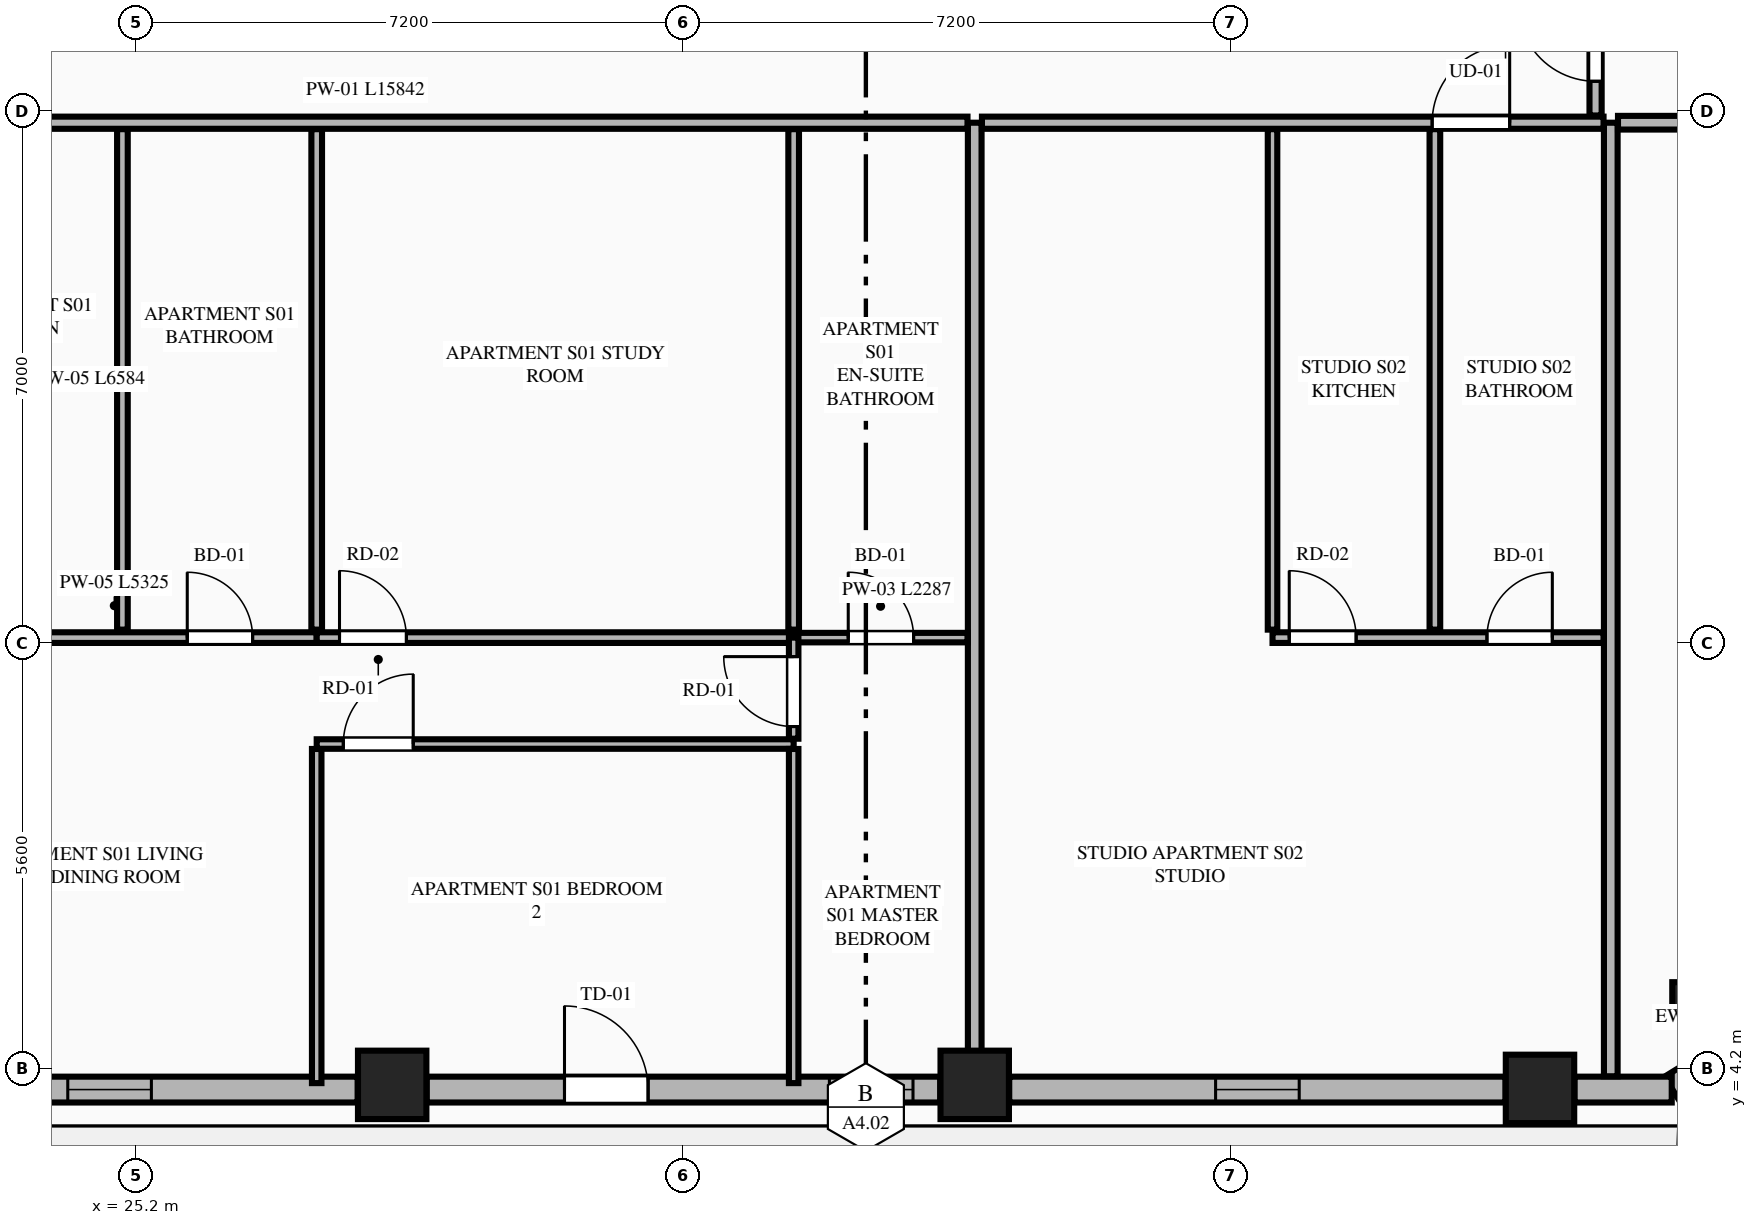
"""IFC4 building model, lengths in metres.
Left out: names, types, materials, properties, quantities, classifications, styles, units other than length and angle.
Written with IfcOpenShell. Run it as: python <this file> out.ifc"""

import sys

from ifc_helpers import new_model, si_unit, direction, frame, frame_2d, origin, origin_2d, place, context, subcontext, project, spatial, rectangle, extrude, element, fill, save


model = new_model("IFC4")
c1 = context("Model", 3, precision=1e-05, world=origin(), true_north=direction((0.0, 1.0)))
c2 = subcontext(c1, "Body", "Model", "MODEL_VIEW")
j1 = project(units=[si_unit("LENGTHUNIT", "METRE"), si_unit("PLANEANGLEUNIT", "RADIAN")], contexts=[c1])
p1 = place(None, origin())
s1 = spatial("IfcSite", under=j1, at=p1, CompositionType="ELEMENT")
p2 = place(p1, origin())
s2 = spatial("IfcBuilding", under=s1, at=p2, CompositionType="ELEMENT")
p3 = place(p2, frame((0.0, 0.0, 157.05)))
s3 = spatial("IfcBuildingStorey", under=s2, at=p3, CompositionType="ELEMENT", Elevation=157.05)
for number, where, z_axis, x_axis in (
    (1, (28.568, 3.992, 0.0), (0.0, 0.0, 1.0), (1.0, 0.0, 0.0)),
    (2, (36.232, 3.992, 0.0), (0.0, 0.0, 1.0), (1.0, 0.0, 0.0)),
    (3, (43.669, 3.939, 0.0), (0.0, 0.0, 1.0), (1.0, 0.0, 0.0)),
):
    element("IfcColumn", number, at=place(p3, frame(where, z_axis=z_axis, x_axis=x_axis)), inside=s3, PredefinedType="COLUMN", context=c2, shape_type="SweptSolid", body=[
        extrude(rectangle(XDim=0.9, YDim=0.9, at=origin_2d()), origin(), (0.0, 0.0, 1.0), 3.55),
    ])
p4 = place(p3, frame((45.659, 5.093, 0.0), z_axis=(0.0, 0.0, 1.0), x_axis=(0.865160173452, 0.501495637342, 0.0)))
e4 = element("IfcColumn", 4, at=p4, inside=s3, PredefinedType="PILASTER", context=c2, shape_type="SweptSolid", body=[
    extrude(rectangle(XDim=0.5, YDim=0.35, at=origin_2d()), origin(), (0.0, 0.0, 1.0), 3.55),
])
p5 = place(p3, frame((45.397, 3.955, 0.0), z_axis=(0.0, 0.0, 1.0), x_axis=(0.851798915137, 0.523868884523, 0.0)))
e5 = element("IfcWall", 5, at=p5, inside=s3, PredefinedType="STANDARD", context=c2, shape_type="SweptSolid", body=[
    extrude(rectangle(XDim=1.848, YDim=0.34, at=frame_2d((0.924, 0.0))), origin(), (0.0, 0.0, 1.0), 3.34),
])
p6 = place(p3, frame((21.585, 3.93, 0.0), z_axis=(0.0, 0.0, 1.0), x_axis=(1.0, 0.0, 0.0)))
e6 = element("IfcWall", 6, at=p6, inside=s3, PredefinedType="STANDARD", context=c2, shape_type="SweptSolid", body=[
    extrude(rectangle(XDim=6.529, YDim=0.34, at=frame_2d((3.265, 0.0))), origin(), (0.0, 0.0, 1.0), 2.797),
])
p7 = place(p6, frame((2.715, 0.0, 0.75)))
e7 = element("IfcOpeningElement", 7, at=p7, cuts=e6, PredefinedType="OPENING", context=c2, shape_type="SweptSolid", body=[
    extrude(rectangle(XDim=1.1, YDim=1.897, at=frame_2d((0.55, 0.948))), frame((0.0, 0.18, 0.0), z_axis=(0.0, -1.0, 0.0), x_axis=(1.0, 0.0, 0.0)), (0.0, 0.0, 1.0), 0.36),
])
p8 = place(p3, frame((29.022, 3.93, 0.0), z_axis=(0.0, 0.0, 1.0), x_axis=(1.0, 0.0, 0.0)))
e8 = element("IfcWall", 8, at=p8, inside=s3, PredefinedType="STANDARD", context=c2, shape_type="SweptSolid", body=[
    extrude(rectangle(XDim=6.756, YDim=0.34, at=frame_2d((3.378, 0.0))), origin(), (0.0, 0.0, 1.0), 2.797),
])
p9 = place(p8, frame((1.813, 0.0, 0.0)))
e9 = element("IfcOpeningElement", 9, at=p9, cuts=e8, PredefinedType="OPENING", context=c2, shape_type="SweptSolid", body=[
    extrude(rectangle(XDim=1.1, YDim=2.25, at=frame_2d((0.55, 1.125))), frame((0.0, 0.18, 0.0), z_axis=(0.0, -1.0, 0.0), x_axis=(1.0, 0.0, 0.0)), (0.0, 0.0, 1.0), 0.36),
])
p10 = place(p8, frame((5.298, 0.0, 0.75)))
e10 = element("IfcOpeningElement", 10, at=p10, cuts=e8, PredefinedType="OPENING", context=c2, shape_type="SweptSolid", body=[
    extrude(rectangle(XDim=1.1, YDim=1.897, at=frame_2d((0.55, 0.948))), frame((0.0, 0.18, 0.0), z_axis=(0.0, -1.0, 0.0), x_axis=(1.0, 0.0, 0.0)), (0.0, 0.0, 1.0), 0.36),
])
p11 = place(p3, frame((36.686, 3.93, 0.0), z_axis=(0.0, 0.0, 1.0), x_axis=(1.0, 0.0, 0.0)))
e11 = element("IfcWall", 11, at=p11, inside=s3, PredefinedType="STANDARD", context=c2, shape_type="SweptSolid", body=[
    extrude(rectangle(XDim=6.529, YDim=0.34, at=frame_2d((3.265, 0.0))), origin(), (0.0, 0.0, 1.0), 2.797),
])
p12 = place(p11, frame((2.715, 0.0, 0.75)))
e12 = element("IfcOpeningElement", 12, at=p12, cuts=e11, PredefinedType="OPENING", context=c2, shape_type="SweptSolid", body=[
    extrude(rectangle(XDim=1.1, YDim=1.897, at=frame_2d((0.55, 0.948))), frame((0.0, 0.18, 0.0), z_axis=(0.0, -1.0, 0.0), x_axis=(1.0, 0.0, 0.0)), (0.0, 0.0, 1.0), 0.36),
])
p13 = place(p3, frame((44.123, 3.93, 0.0), z_axis=(0.0, 0.0, 1.0), x_axis=(1.0, 0.0, 0.0)))
e13 = element("IfcWall", 13, at=p13, inside=s3, PredefinedType="STANDARD", context=c2, shape_type="SweptSolid", body=[
    extrude(rectangle(XDim=1.279, YDim=0.34, at=frame_2d((0.64, 0.0))), origin(), (0.0, 0.0, 1.0), 3.34),
])
p14 = place(p3, frame((36.232, 4.105, 0.0), z_axis=(0.0, 0.0, 1.0), x_axis=(0.0, 1.0, 0.0)))
e14 = element("IfcWall", 14, at=p14, inside=s3, PredefinedType="PARTITIONING", context=c2, shape_type="SweptSolid", body=[
    extrude(rectangle(XDim=12.545, YDim=0.18, at=frame_2d((6.272, 0.0))), origin(), (0.0, 0.0, 1.0), 2.722),
])
p15 = place(p3, frame((44.6, 4.105, 0.0), z_axis=(0.0, 0.0, 1.0), x_axis=(0.0, 1.0, 0.0)))
e15 = element("IfcWall", 15, at=p15, inside=s3, PredefinedType="PARTITIONING", context=c2, shape_type="SweptSolid", body=[
    extrude(rectangle(XDim=12.545, YDim=0.18, at=frame_2d((6.272, 0.0))), origin(), (0.0, 0.0, 1.0), 3.34),
])
p16 = place(p3, frame((20.295, 16.65, 0.0), z_axis=(0.0, 0.0, 1.0), x_axis=(1.0, 0.0, 0.0)))
e16 = element("IfcWall", 16, at=p16, inside=s3, PredefinedType="PARTITIONING", context=c2, shape_type="SweptSolid", body=[
    extrude(rectangle(XDim=15.842, YDim=0.16, at=frame_2d((7.921, 0.0))), origin(), (0.0, 0.0, 1.0), 3.34),
])
p17 = place(p16, frame((0.405, 0.0, 0.0)))
e17 = element("IfcOpeningElement", 17, at=p17, cuts=e16, PredefinedType="OPENING", context=c2, shape_type="SweptSolid", body=[
    extrude(rectangle(XDim=1.35, YDim=2.35, at=frame_2d((0.675, 1.175))), frame((0.0, 0.09, 0.0), z_axis=(0.0, -1.0, 0.0), x_axis=(1.0, 0.0, 0.0)), (0.0, 0.0, 1.0), 0.18),
])
p18 = place(p3, frame((22.25, 9.876, 0.0), z_axis=(0.0, 0.0, 1.0), x_axis=(1.0, 0.0, 0.0)))
e18 = element("IfcWall", 18, at=p18, inside=s3, PredefinedType="PLUMBINGWALL", context=c2, shape_type="SweptSolid", body=[
    extrude(rectangle(XDim=5.325, YDim=0.14, at=frame_2d((2.663, 0.0))), origin(), (0.0, 0.0, 1.0), 3.34),
])
p19 = place(p18, frame((3.622, 0.0, 0.0)))
e19 = element("IfcOpeningElement", 19, at=p19, cuts=e18, PredefinedType="OPENING", context=c2, shape_type="SweptSolid", body=[
    extrude(rectangle(XDim=0.86, YDim=2.1, at=frame_2d((0.43, 1.05))), frame((0.0, 0.08, 0.0), z_axis=(0.0, -1.0, 0.0), x_axis=(1.0, 0.0, 0.0)), (0.0, 0.0, 1.0), 0.16),
])
p20 = place(p18, frame((0.26, 0.0, 0.0)))
e20 = element("IfcOpeningElement", 20, at=p20, cuts=e18, PredefinedType="OPENING", context=c2, shape_type="SweptSolid", body=[
    extrude(rectangle(XDim=0.88, YDim=2.15, at=frame_2d((0.44, 1.075))), frame((0.0, 0.08, 0.0), z_axis=(0.0, -1.0, 0.0), x_axis=(1.0, 0.0, 0.0)), (0.0, 0.0, 1.0), 0.16),
])
p21 = place(p3, frame((27.575, 9.876, 0.0), z_axis=(0.0, 0.0, 1.0), x_axis=(1.0, 0.0, 0.0)))
e21 = element("IfcWall", 21, at=p21, inside=s3, PredefinedType="PLUMBINGWALL", context=c2, shape_type="SweptSolid", body=[
    extrude(rectangle(XDim=6.275, YDim=0.14, at=frame_2d((3.138, 0.0))), origin(), (0.0, 0.0, 1.0), 3.34),
])
p22 = place(p21, frame((0.3, 0.0, 0.0)))
e22 = element("IfcOpeningElement", 22, at=p22, cuts=e21, PredefinedType="OPENING", context=c2, shape_type="SweptSolid", body=[
    extrude(rectangle(XDim=0.88, YDim=2.15, at=frame_2d((0.44, 1.075))), frame((0.0, 0.08, 0.0), z_axis=(0.0, -1.0, 0.0), x_axis=(1.0, 0.0, 0.0)), (0.0, 0.0, 1.0), 0.16),
])
p23 = place(p3, frame((33.85, 9.876, 0.0), z_axis=(0.0, 0.0, 1.0), x_axis=(1.0, 0.0, 0.0)))
e23 = element("IfcWall", 23, at=p23, inside=s3, PredefinedType="PARTITIONING", context=c2, shape_type="SweptSolid", body=[
    extrude(rectangle(XDim=2.287, YDim=0.125, at=frame_2d((1.144, 0.0))), origin(), (0.0, 0.0, 1.0), 3.34),
])
p24 = place(p23, frame((0.718, 0.0, 0.0)))
e24 = element("IfcOpeningElement", 24, at=p24, cuts=e23, PredefinedType="OPENING", context=c2, shape_type="SweptSolid", body=[
    extrude(rectangle(XDim=0.86, YDim=2.1, at=frame_2d((0.43, 1.05))), frame((0.0, 0.073, 0.0), z_axis=(0.0, -1.0, 0.0), x_axis=(1.0, 0.0, 0.0)), (0.0, 0.0, 1.0), 0.145),
])
p25 = place(p3, frame((25.019, 9.981, 0.0), z_axis=(0.0, 0.0, 1.0), x_axis=(0.0, 1.0, 0.0)))
e25 = element("IfcWall", 25, at=p25, inside=s3, PredefinedType="PLUMBINGWALL", context=c2, shape_type="SweptSolid", body=[
    extrude(rectangle(XDim=6.584, YDim=0.14, at=frame_2d((3.292, 0.0))), origin(), (0.0, 0.0, 1.0), 3.34),
])
p26 = place(p3, frame((27.575, 4.015, 0.0), z_axis=(0.0, 0.0, 1.0), x_axis=(0.0, 1.0, 0.0)))
e26 = element("IfcWall", 26, at=p26, inside=s3, PredefinedType="PARTITIONING", context=c2, shape_type="SweptSolid", body=[
    extrude(rectangle(XDim=4.396, YDim=0.125, at=frame_2d((2.198, 0.0))), origin(), (0.0, 0.0, 1.0), 3.34),
])
p27 = place(p3, frame((27.575, 8.476, 0.0), z_axis=(0.0, 0.0, 1.0), x_axis=(1.0, 0.0, 0.0)))
e27 = element("IfcWall", 27, at=p27, inside=s3, PredefinedType="PARTITIONING", context=c2, shape_type="SweptSolid", body=[
    extrude(rectangle(XDim=6.275, YDim=0.125, at=frame_2d((3.138, 0.0))), origin(), (0.0, 0.0, 1.0), 3.34),
])
p28 = place(p27, frame((0.35, 0.0, 0.0)))
e28 = element("IfcOpeningElement", 28, at=p28, cuts=e27, PredefinedType="OPENING", context=c2, shape_type="SweptSolid", body=[
    extrude(rectangle(XDim=0.92, YDim=2.15, at=frame_2d((0.46, 1.075))), frame((0.0, 0.073, 0.0), z_axis=(0.0, -1.0, 0.0), x_axis=(1.0, 0.0, 0.0)), (0.0, 0.0, 1.0), 0.145),
])
p29 = place(p3, frame((33.85, 8.546, 0.0), z_axis=(0.0, 0.0, 1.0), x_axis=(0.0, 1.0, 0.0)))
e29 = element("IfcWall", 29, at=p29, inside=s3, PredefinedType="PARTITIONING", context=c2, shape_type="SweptSolid", body=[
    extrude(rectangle(XDim=1.33, YDim=0.125, at=frame_2d((0.665, 0.0))), origin(), (0.0, 0.0, 1.0), 3.34),
])
p30 = place(p29, frame((0.16, 0.0, 0.0)))
e30 = element("IfcOpeningElement", 30, at=p30, cuts=e29, PredefinedType="OPENING", context=c2, shape_type="SweptSolid", body=[
    extrude(rectangle(XDim=0.92, YDim=2.15, at=frame_2d((0.46, 1.075))), frame((0.0, 0.073, 0.0), z_axis=(0.0, -1.0, 0.0), x_axis=(1.0, 0.0, 0.0)), (0.0, 0.0, 1.0), 0.145),
])
for number, where, z_axis, x_axis in (
    (31, (27.575, 9.981, 0.0), (0.0, 0.0, 1.0), (0.0, 1.0, 0.0)),
    (32, (33.85, 9.981, 0.0), (0.0, 0.0, 1.0), (0.0, 1.0, 0.0)),
):
    element("IfcWall", number, at=place(p3, frame(where, z_axis=z_axis, x_axis=x_axis)), inside=s3, PredefinedType="PLUMBINGWALL", context=c2, shape_type="SweptSolid", body=[
        extrude(rectangle(XDim=6.584, YDim=0.14, at=frame_2d((3.292, 0.0))), origin(), (0.0, 0.0, 1.0), 3.34),
    ])
p31 = place(p3, frame((33.85, 4.015, 0.0), z_axis=(0.0, 0.0, 1.0), x_axis=(0.0, 1.0, 0.0)))
e33 = element("IfcWall", 33, at=p31, inside=s3, PredefinedType="PARTITIONING", context=c2, shape_type="SweptSolid", body=[
    extrude(rectangle(XDim=4.396, YDim=0.125, at=frame_2d((2.198, 0.0))), origin(), (0.0, 0.0, 1.0), 3.34),
])
p32 = place(p3, frame((36.327, 16.65, 0.0), z_axis=(0.0, 0.0, 1.0), x_axis=(1.0, 0.0, 0.0)))
e34 = element("IfcWall", 34, at=p32, inside=s3, PredefinedType="PARTITIONING", context=c2, shape_type="SweptSolid", body=[
    extrude(rectangle(XDim=8.178, YDim=0.16, at=frame_2d((4.089, 0.0))), origin(), (0.0, 0.0, 1.0), 3.34),
])
p33 = place(p32, frame((5.923, 0.0, 0.0)))
e35 = element("IfcOpeningElement", 35, at=p33, cuts=e34, PredefinedType="OPENING", context=c2, shape_type="SweptSolid", body=[
    extrude(rectangle(XDim=1.02, YDim=2.25, at=frame_2d((0.51, 1.125))), frame((0.0, 0.09, 0.0), z_axis=(0.0, -1.0, 0.0), x_axis=(1.0, 0.0, 0.0)), (0.0, 0.0, 1.0), 0.18),
])
p34 = place(p3, frame((40.15, 9.981, 0.0), z_axis=(0.0, 0.0, 1.0), x_axis=(0.0, 1.0, 0.0)))
e36 = element("IfcWall", 36, at=p34, inside=s3, PredefinedType="PARTITIONING", context=c2, shape_type="SweptSolid", body=[
    extrude(rectangle(XDim=6.584, YDim=0.125, at=frame_2d((3.292, 0.0))), origin(), (0.0, 0.0, 1.0), 3.34),
])
p35 = place(p3, frame((40.15, 9.876, 0.0), z_axis=(0.0, 0.0, 1.0), x_axis=(1.0, 0.0, 0.0)))
e37 = element("IfcWall", 37, at=p35, inside=s3, PredefinedType="PLUMBINGWALL", context=c2, shape_type="SweptSolid", body=[
    extrude(rectangle(XDim=4.355, YDim=0.14, at=frame_2d((2.177, 0.0))), origin(), (0.0, 0.0, 1.0), 3.34),
])
p36 = place(p35, frame((2.821, 0.0, 0.0)))
e38 = element("IfcOpeningElement", 38, at=p36, cuts=e37, PredefinedType="OPENING", context=c2, shape_type="SweptSolid", body=[
    extrude(rectangle(XDim=0.86, YDim=2.1, at=frame_2d((0.43, 1.05))), frame((0.0, 0.08, 0.0), z_axis=(0.0, -1.0, 0.0), x_axis=(1.0, 0.0, 0.0)), (0.0, 0.0, 1.0), 0.16),
])
p37 = place(p35, frame((0.22, 0.0, 0.0)))
e39 = element("IfcOpeningElement", 39, at=p37, cuts=e37, PredefinedType="OPENING", context=c2, shape_type="SweptSolid", body=[
    extrude(rectangle(XDim=0.88, YDim=2.15, at=frame_2d((0.44, 1.075))), frame((0.0, 0.08, 0.0), z_axis=(0.0, -1.0, 0.0), x_axis=(1.0, 0.0, 0.0)), (0.0, 0.0, 1.0), 0.16),
])
p38 = place(p3, frame((42.286, 9.981, 0.0), z_axis=(0.0, 0.0, 1.0), x_axis=(0.0, 1.0, 0.0)))
e40 = element("IfcWall", 40, at=p38, inside=s3, PredefinedType="PLUMBINGWALL", context=c2, shape_type="SweptSolid", body=[
    extrude(rectangle(XDim=6.584, YDim=0.14, at=frame_2d((3.292, 0.0))), origin(), (0.0, 0.0, 1.0), 2.722),
])
p39 = place(p3, frame((44.695, 16.65, 0.0), z_axis=(0.0, 0.0, 1.0), x_axis=(1.0, 0.0, 0.0)))
e41 = element("IfcWall", 41, at=p39, inside=s3, PredefinedType="PARTITIONING", context=c2, shape_type="SweptSolid", body=[
    extrude(rectangle(XDim=7.996, YDim=0.18, at=frame_2d((3.998, 0.0))), origin(), (0.0, 0.0, 1.0), 3.34),
])
p40 = place(p3, frame((44.4, 16.745, 0.0), z_axis=(0.0, 0.0, 1.0), x_axis=(0.0, 1.0, 0.0)))
e42 = element("IfcWall", 42, at=p40, inside=s3, PredefinedType="PARTITIONING", context=c2, shape_type="SweptSolid", body=[
    extrude(rectangle(XDim=18.31, YDim=0.16, at=frame_2d((9.155, 0.0))), origin(), (0.0, 0.0, 1.0), 3.34),
])
p41 = place(p40, frame((0.45, 0.0, 0.0)))
e43 = element("IfcOpeningElement", 43, at=p41, cuts=e42, PredefinedType="OPENING", context=c2, shape_type="SweptSolid", body=[
    extrude(rectangle(XDim=1.02, YDim=2.25, at=frame_2d((0.51, 1.125))), frame((0.0, 0.09, 0.0), z_axis=(0.0, -1.0, 0.0), x_axis=(1.0, 0.0, 0.0)), (0.0, 0.0, 1.0), 0.18),
])
p42 = place(p7, origin())
e44 = element("IfcWindow", 44, at=p42, inside=s3, PartitioningType="SINGLE_PANEL", PredefinedType="WINDOW", context=c2, shape_type="SweptSolid", body=[
    extrude(rectangle(XDim=1.1, YDim=1.897, at=frame_2d((0.55, 0.948))), frame((0.0, 0.03, 0.0), z_axis=(0.0, -1.0, 0.0), x_axis=(1.0, 0.0, 0.0)), (0.0, 0.0, 1.0), 0.06),
])
fill(e7, e44)
p43 = place(p9, origin())
e45 = element("IfcDoor", 45, at=p43, inside=s3, OperationType="SINGLE_SWING_LEFT", PredefinedType="DOOR", context=c2, shape_type="SweptSolid", body=[
    extrude(rectangle(XDim=1.1, YDim=2.25, at=frame_2d((0.55, 1.125))), frame((0.0, 0.025, 0.0), z_axis=(0.0, -1.0, 0.0), x_axis=(1.0, 0.0, 0.0)), (0.0, 0.0, 1.0), 0.05),
])
fill(e9, e45)
p44 = place(p12, origin())
e46 = element("IfcWindow", 46, at=p44, inside=s3, PartitioningType="SINGLE_PANEL", PredefinedType="WINDOW", context=c2, shape_type="SweptSolid", body=[
    extrude(rectangle(XDim=1.1, YDim=1.897, at=frame_2d((0.55, 0.948))), frame((0.0, 0.03, 0.0), z_axis=(0.0, -1.0, 0.0), x_axis=(1.0, 0.0, 0.0)), (0.0, 0.0, 1.0), 0.06),
])
fill(e12, e46)
p45 = place(p19, origin())
e47 = element("IfcDoor", 47, at=p45, inside=s3, OperationType="SINGLE_SWING_LEFT", PredefinedType="DOOR", context=c2, shape_type="SweptSolid", body=[
    extrude(rectangle(XDim=0.86, YDim=2.1, at=frame_2d((0.43, 1.05))), frame((0.0, 0.025, 0.0), z_axis=(0.0, -1.0, 0.0), x_axis=(1.0, 0.0, 0.0)), (0.0, 0.0, 1.0), 0.05),
])
fill(e19, e47)
p46 = place(p24, origin())
e48 = element("IfcDoor", 48, at=p46, inside=s3, OperationType="SINGLE_SWING_LEFT", PredefinedType="DOOR", context=c2, shape_type="SweptSolid", body=[
    extrude(rectangle(XDim=0.86, YDim=2.1, at=frame_2d((0.43, 1.05))), frame((0.0, 0.025, 0.0), z_axis=(0.0, -1.0, 0.0), x_axis=(1.0, 0.0, 0.0)), (0.0, 0.0, 1.0), 0.05),
])
fill(e24, e48)
p47 = place(p22, origin())
e49 = element("IfcDoor", 49, at=p47, inside=s3, OperationType="SINGLE_SWING_LEFT", PredefinedType="DOOR", context=c2, shape_type="SweptSolid", body=[
    extrude(rectangle(XDim=0.88, YDim=2.15, at=frame_2d((0.44, 1.075))), frame((0.0, 0.025, 0.0), z_axis=(0.0, -1.0, 0.0), x_axis=(1.0, 0.0, 0.0)), (0.0, 0.0, 1.0), 0.05),
])
fill(e22, e49)
p48 = place(p28, origin())
e50 = element("IfcDoor", 50, at=p48, inside=s3, OperationType="SINGLE_SWING_RIGHT", PredefinedType="DOOR", context=c2, shape_type="SweptSolid", body=[
    extrude(rectangle(XDim=0.92, YDim=2.15, at=frame_2d((0.46, 1.075))), frame((0.0, 0.025, 0.0), z_axis=(0.0, -1.0, 0.0), x_axis=(1.0, 0.0, 0.0)), (0.0, 0.0, 1.0), 0.05),
])
fill(e28, e50)
p49 = place(p30, origin())
e51 = element("IfcDoor", 51, at=p49, inside=s3, OperationType="SINGLE_SWING_RIGHT", PredefinedType="DOOR", context=c2, shape_type="SweptSolid", body=[
    extrude(rectangle(XDim=0.92, YDim=2.15, at=frame_2d((0.46, 1.075))), frame((0.0, 0.025, 0.0), z_axis=(0.0, -1.0, 0.0), x_axis=(1.0, 0.0, 0.0)), (0.0, 0.0, 1.0), 0.05),
])
fill(e30, e51)
p50 = place(p36, origin())
e52 = element("IfcDoor", 52, at=p50, inside=s3, OperationType="SINGLE_SWING_RIGHT", PredefinedType="DOOR", context=c2, shape_type="SweptSolid", body=[
    extrude(rectangle(XDim=0.86, YDim=2.1, at=frame_2d((0.43, 1.05))), frame((0.0, 0.025, 0.0), z_axis=(0.0, -1.0, 0.0), x_axis=(1.0, 0.0, 0.0)), (0.0, 0.0, 1.0), 0.05),
])
fill(e38, e52)
p51 = place(p33, origin())
e53 = element("IfcDoor", 53, at=p51, inside=s3, OperationType="SINGLE_SWING_RIGHT", PredefinedType="DOOR", context=c2, shape_type="SweptSolid", body=[
    extrude(rectangle(XDim=1.02, YDim=2.25, at=frame_2d((0.51, 1.125))), frame((0.0, 0.025, 0.0), z_axis=(0.0, -1.0, 0.0), x_axis=(1.0, 0.0, 0.0)), (0.0, 0.0, 1.0), 0.05),
])
fill(e35, e53)
p52 = place(p37, origin())
e54 = element("IfcDoor", 54, at=p52, inside=s3, OperationType="SINGLE_SWING_LEFT", PredefinedType="DOOR", context=c2, shape_type="SweptSolid", body=[
    extrude(rectangle(XDim=0.88, YDim=2.15, at=frame_2d((0.44, 1.075))), frame((0.0, 0.025, 0.0), z_axis=(0.0, -1.0, 0.0), x_axis=(1.0, 0.0, 0.0)), (0.0, 0.0, 1.0), 0.05),
])
fill(e39, e54)
p53 = place(p41, origin())
e55 = element("IfcDoor", 55, at=p53, inside=s3, OperationType="SINGLE_SWING_RIGHT", PredefinedType="DOOR", context=c2, shape_type="SweptSolid", body=[
    extrude(rectangle(XDim=1.02, YDim=2.25, at=frame_2d((0.51, 1.125))), frame((0.0, 0.025, 0.0), z_axis=(0.0, -1.0, 0.0), x_axis=(1.0, 0.0, 0.0)), (0.0, 0.0, 1.0), 0.05),
])
fill(e43, e55)
p54 = place(p10, origin())
e56 = element("IfcWindow", 56, at=p54, inside=s3, PartitioningType="SINGLE_PANEL", PredefinedType="WINDOW", context=c2, shape_type="SweptSolid", body=[
    extrude(rectangle(XDim=1.1, YDim=1.897, at=frame_2d((0.55, 0.948))), frame((0.0, 0.03, 0.0), z_axis=(0.0, -1.0, 0.0), x_axis=(1.0, 0.0, 0.0)), (0.0, 0.0, 1.0), 0.06),
])
fill(e10, e56)
save(model, sys.argv[1])
